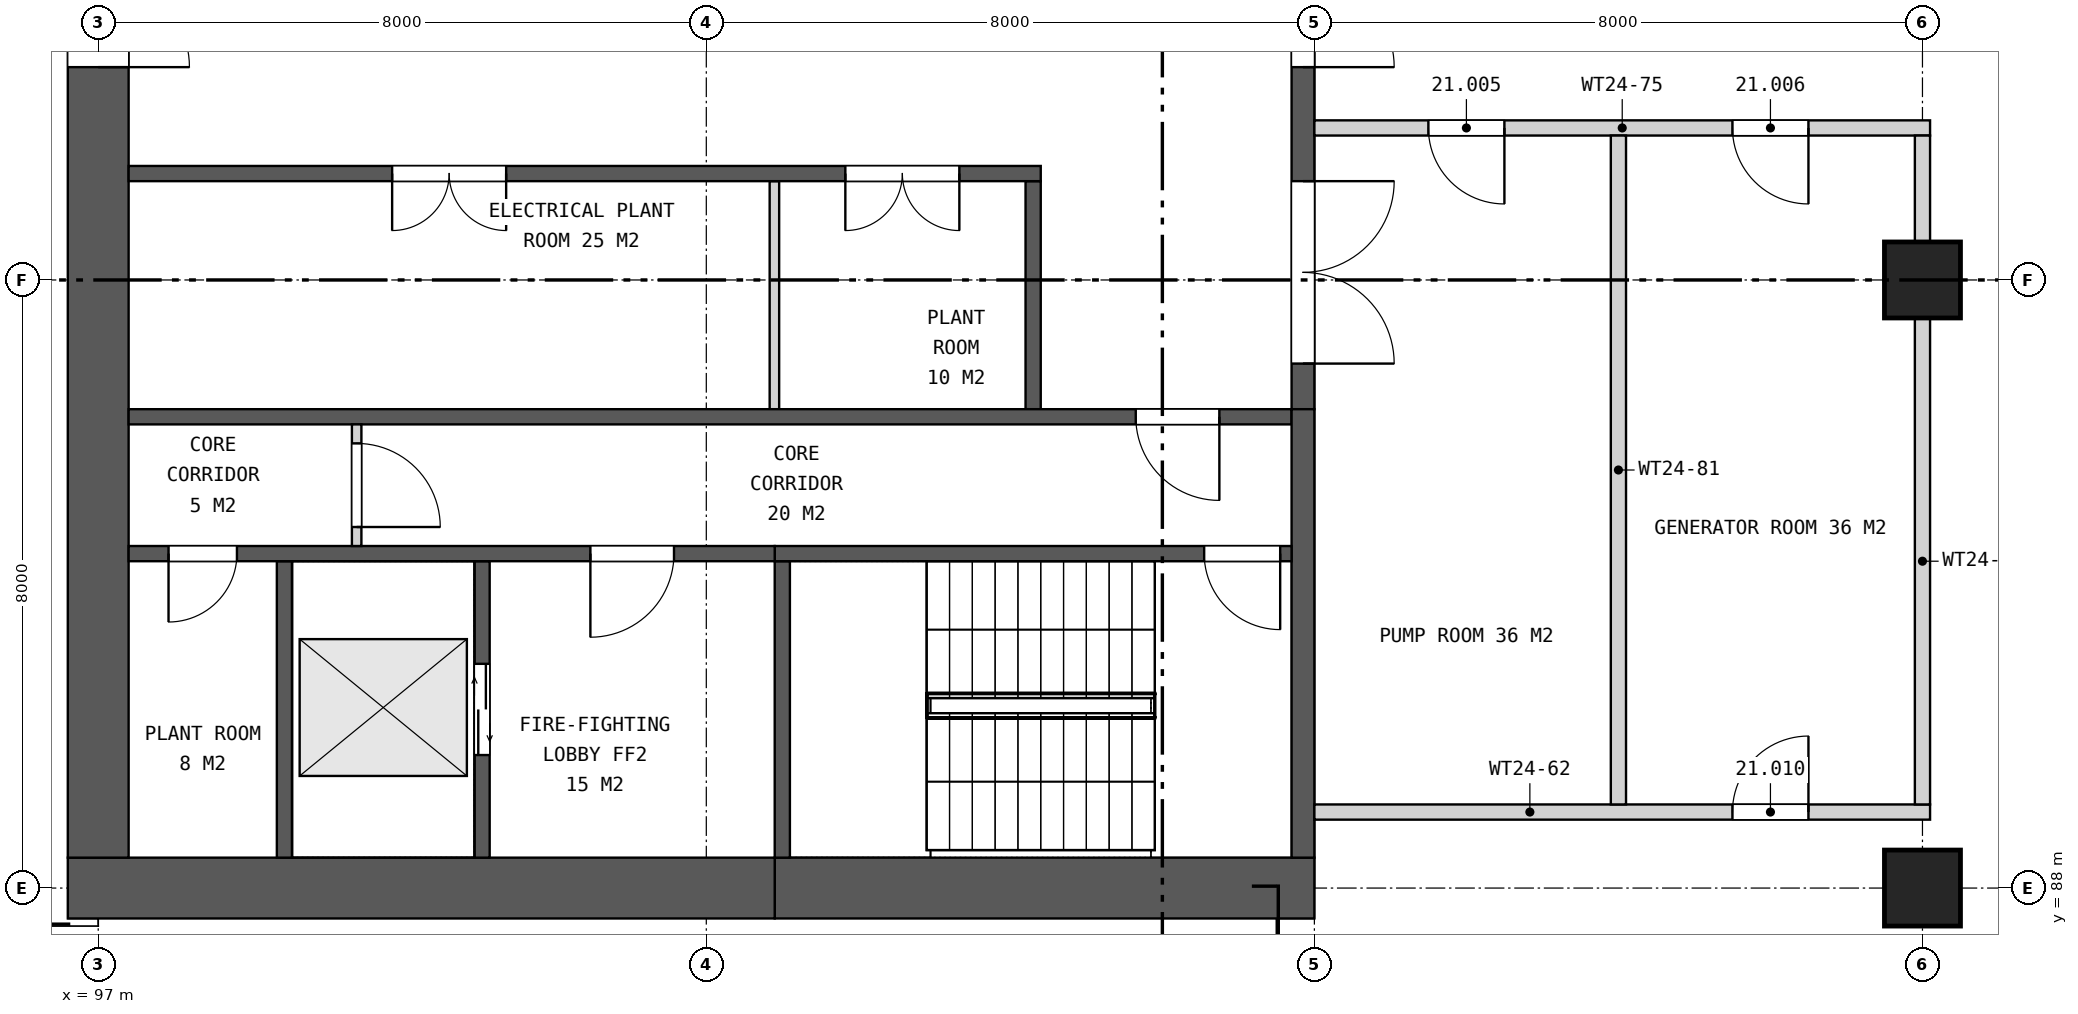
"""IFC4 building model, lengths in metres.
Left out: names, types, materials, properties, quantities, classifications, styles, units other than length and angle.
Written with IfcOpenShell. Run it as: python <this file> out.ifc"""

import sys

from ifc_helpers import new_model, si_unit, direction, frame, frame_2d, origin, origin_2d, place, context, subcontext, project, spatial, rectangle, extrude, element, fill, save


model = new_model("IFC4")
c1 = context("Model", 3, precision=1e-05, world=origin(), true_north=direction((0.0, 1.0)))
c2 = subcontext(c1, "Body", "Model", "MODEL_VIEW")
j1 = project(units=[si_unit("LENGTHUNIT", "METRE"), si_unit("PLANEANGLEUNIT", "RADIAN")], contexts=[c1])
p1 = place(None, origin())
s1 = spatial("IfcSite", under=j1, at=p1, CompositionType="ELEMENT")
p2 = place(p1, origin())
s2 = spatial("IfcBuilding", under=s1, at=p2, CompositionType="ELEMENT")
p3 = place(p2, frame((0.0, 0.0, 105.3)))
s3 = spatial("IfcBuildingStorey", under=s2, at=p3, CompositionType="ELEMENT", Elevation=105.3)
for number, where, z_axis, x_axis in (
    (1, (121.0, 88.0, 0.0), (0.0, 0.0, 1.0), (1.0, 0.0, 0.0)),
    (2, (121.0, 96.0, 0.0), (0.0, 0.0, 1.0), (1.0, 0.0, 0.0)),
):
    element("IfcColumn", number, at=place(p3, frame(where, z_axis=z_axis, x_axis=x_axis)), inside=s3, PredefinedType="COLUMN", context=c2, shape_type="SweptSolid", body=[
        extrude(rectangle(XDim=1.0, YDim=1.0, at=origin_2d()), origin(), (0.0, 0.0, 1.0), 7.4),
    ])
p4 = place(p3, frame((113.0, 88.0, 0.0), z_axis=(0.0, 0.0, 1.0), x_axis=(-1.0, 0.0, 0.0)))
e3 = element("IfcWall", 3, at=p4, inside=s3, PredefinedType="SHEAR", context=c2, shape_type="SweptSolid", body=[
    extrude(rectangle(XDim=7.1, YDim=0.8, at=frame_2d((3.55, 0.0))), origin(), (0.0, 0.0, 1.0), 7.4),
])
p5 = place(p3, frame((105.9, 88.0, 0.0), z_axis=(0.0, 0.0, 1.0), x_axis=(-1.0, 0.0, 0.0)))
e4 = element("IfcWall", 4, at=p5, inside=s3, PredefinedType="SHEAR", context=c2, shape_type="SweptSolid", body=[
    extrude(rectangle(XDim=9.3, YDim=0.8, at=frame_2d((4.65, 0.0))), origin(), (0.0, 0.0, 1.0), 7.4),
])
p6 = place(p3, frame((97.0, 111.6, 0.0), z_axis=(0.0, 0.0, 1.0), x_axis=(0.0, -1.0, 0.0)))
e5 = element("IfcWall", 5, at=p6, inside=s3, PredefinedType="SHEAR", context=c2, shape_type="SweptSolid", body=[
    extrude(rectangle(XDim=23.2, YDim=0.8, at=frame_2d((11.6, 0.0))), origin(), (0.0, 0.0, 1.0), 7.4),
])
p7 = place(p6, frame((10.4, 0.0, 0.0)))
e6 = element("IfcOpeningElement", 6, at=p7, cuts=e5, PredefinedType="OPENING", context=c2, shape_type="SweptSolid", body=[
    extrude(rectangle(XDim=2.4, YDim=2.4, at=frame_2d((1.2, 1.2))), frame((0.0, 0.41, 0.0), z_axis=(0.0, -1.0, 0.0), x_axis=(1.0, 0.0, 0.0)), (0.0, 0.0, 1.0), 0.82),
])
p8 = place(p3, frame((112.85, 105.7, 0.0), z_axis=(0.0, 0.0, 1.0), x_axis=(0.0, -1.0, 0.0)))
e7 = element("IfcWall", 7, at=p8, inside=s3, PredefinedType="SHEAR", context=c2, shape_type="SweptSolid", body=[
    extrude(rectangle(XDim=11.4, YDim=0.3, at=frame_2d((5.7, 0.0))), origin(), (0.0, 0.0, 1.0), 7.4),
])
p9 = place(p8, frame((0.6, 0.0, 0.0)))
e8 = element("IfcOpeningElement", 8, at=p9, cuts=e7, PredefinedType="OPENING", context=c2, shape_type="SweptSolid", body=[
    extrude(rectangle(XDim=2.4, YDim=2.4, at=frame_2d((1.2, 1.2))), frame((0.0, 0.16, 0.0), z_axis=(0.0, -1.0, 0.0), x_axis=(1.0, 0.0, 0.0)), (0.0, 0.0, 1.0), 0.32),
])
p10 = place(p8, frame((4.5, 0.0, 0.0)))
e9 = element("IfcOpeningElement", 9, at=p10, cuts=e7, PredefinedType="OPENING", context=c2, shape_type="SweptSolid", body=[
    extrude(rectangle(XDim=2.4, YDim=2.4, at=frame_2d((1.2, 1.2))), frame((0.0, 0.16, 0.0), z_axis=(0.0, -1.0, 0.0), x_axis=(1.0, 0.0, 0.0)), (0.0, 0.0, 1.0), 0.32),
])
p11 = place(p8, frame((8.4, 0.0, 0.0)))
e10 = element("IfcOpeningElement", 10, at=p11, cuts=e7, PredefinedType="OPENING", context=c2, shape_type="SweptSolid", body=[
    extrude(rectangle(XDim=2.4, YDim=2.4, at=frame_2d((1.2, 1.2))), frame((0.0, 0.16, 0.0), z_axis=(0.0, -1.0, 0.0), x_axis=(1.0, 0.0, 0.0)), (0.0, 0.0, 1.0), 0.32),
])
p12 = place(p3, frame((109.3, 97.3, 0.0), z_axis=(0.0, 0.0, 1.0), x_axis=(0.0, -1.0, 0.0)))
e11 = element("IfcWall", 11, at=p12, inside=s3, PredefinedType="SHEAR", context=c2, shape_type="SweptSolid", body=[
    extrude(rectangle(XDim=3.0, YDim=0.2, at=frame_2d((1.5, 0.0))), origin(), (0.0, 0.0, 1.0), 7.4),
])
p13 = place(p3, frame((105.896, 97.3, 0.0), z_axis=(0.0, 0.0, 1.0), x_axis=(0.0, -1.0, 0.0)))
e12 = element("IfcWall", 12, at=p13, inside=s3, PredefinedType="PARTITIONING", context=c2, shape_type="SweptSolid", body=[
    extrude(rectangle(XDim=3.0, YDim=0.125, at=frame_2d((1.5, 0.0))), origin(), (0.0, 0.0, 1.0), 7.4),
])
p14 = place(p3, frame((109.4, 97.4, 0.0), z_axis=(0.0, 0.0, 1.0), x_axis=(-1.0, 0.0, 0.0)))
e13 = element("IfcWall", 13, at=p14, inside=s3, PredefinedType="SHEAR", context=c2, shape_type="SweptSolid", body=[
    extrude(rectangle(XDim=12.0, YDim=0.2, at=frame_2d((6.0, 0.0))), origin(), (0.0, 0.0, 1.0), 7.4),
])
p15 = place(p14, frame((1.071, 0.0, 0.0)))
e14 = element("IfcOpeningElement", 14, at=p15, cuts=e13, PredefinedType="OPENING", context=c2, shape_type="SweptSolid", body=[
    extrude(rectangle(XDim=1.5, YDim=2.1, at=frame_2d((0.75, 1.05))), frame((0.0, 0.11, 0.0), z_axis=(0.0, -1.0, 0.0), x_axis=(1.0, 0.0, 0.0)), (0.0, 0.0, 1.0), 0.22),
])
p16 = place(p14, frame((7.033, 0.0, 0.0)))
e15 = element("IfcOpeningElement", 15, at=p16, cuts=e13, PredefinedType="OPENING", context=c2, shape_type="SweptSolid", body=[
    extrude(rectangle(XDim=1.5, YDim=2.1, at=frame_2d((0.75, 1.05))), frame((0.0, 0.11, 0.0), z_axis=(0.0, -1.0, 0.0), x_axis=(1.0, 0.0, 0.0)), (0.0, 0.0, 1.0), 0.22),
])
p17 = place(p3, frame((112.7, 94.2, 0.0), z_axis=(0.0, 0.0, 1.0), x_axis=(-1.0, 0.0, 0.0)))
e16 = element("IfcWall", 16, at=p17, inside=s3, PredefinedType="SHEAR", context=c2, shape_type="SweptSolid", body=[
    extrude(rectangle(XDim=15.3, YDim=0.2, at=frame_2d((7.65, 0.0))), origin(), (0.0, 0.0, 1.0), 7.4),
])
p18 = place(p17, frame((0.95, 0.0, 0.0)))
e17 = element("IfcOpeningElement", 17, at=p18, cuts=e16, PredefinedType="OPENING", context=c2, shape_type="SweptSolid", body=[
    extrude(rectangle(XDim=1.1, YDim=2.1, at=frame_2d((0.55, 1.05))), frame((0.0, 0.11, 0.0), z_axis=(0.0, -1.0, 0.0), x_axis=(1.0, 0.0, 0.0)), (0.0, 0.0, 1.0), 0.22),
])
p19 = place(p3, frame((112.85, 94.3, 0.0), z_axis=(0.0, 0.0, 1.0), x_axis=(0.0, -1.0, 0.0)))
e18 = element("IfcWall", 18, at=p19, inside=s3, PredefinedType="SHEAR", context=c2, shape_type="SweptSolid", body=[
    extrude(rectangle(XDim=5.9, YDim=0.3, at=frame_2d((2.95, 0.0))), origin(), (0.0, 0.0, 1.0), 7.4),
])
p20 = place(p3, frame((106.0, 92.3, 0.0), z_axis=(0.0, 0.0, 1.0), x_axis=(0.0, -1.0, 0.0)))
e19 = element("IfcWall", 19, at=p20, inside=s3, PredefinedType="SHEAR", context=c2, shape_type="SweptSolid", body=[
    extrude(rectangle(XDim=3.9, YDim=0.2, at=frame_2d((1.95, 0.0))), origin(), (0.0, 0.0, 1.0), 7.4),
])
p21 = place(p3, frame((102.05, 92.3, 0.0), z_axis=(0.0, 0.0, 1.0), x_axis=(0.0, -1.0, 0.0)))
e20 = element("IfcWall", 20, at=p21, inside=s3, PredefinedType="SHEAR", context=c2, shape_type="SweptSolid", body=[
    extrude(rectangle(XDim=3.9, YDim=0.2, at=frame_2d((1.95, 0.0))), origin(), (0.0, 0.0, 1.0), 7.4),
])
p22 = place(p21, frame((1.35, 0.0, 0.0)))
e21 = element("IfcOpeningElement", 21, at=p22, cuts=e20, PredefinedType="OPENING", context=c2, shape_type="SweptSolid", body=[
    extrude(rectangle(XDim=1.2, YDim=2.1, at=frame_2d((0.6, 1.05))), frame((0.0, 0.11, 0.0), z_axis=(0.0, -1.0, 0.0), x_axis=(1.0, 0.0, 0.0)), (0.0, 0.0, 1.0), 0.22),
])
p23 = place(p3, frame((99.45, 92.3, 0.0), z_axis=(0.0, 0.0, 1.0), x_axis=(0.0, -1.0, 0.0)))
e22 = element("IfcWall", 22, at=p23, inside=s3, PredefinedType="SHEAR", context=c2, shape_type="SweptSolid", body=[
    extrude(rectangle(XDim=3.9, YDim=0.2, at=frame_2d((1.95, 0.0))), origin(), (0.0, 0.0, 1.0), 7.4),
])
p24 = place(p3, frame((112.7, 92.4, 0.0), z_axis=(0.0, 0.0, 1.0), x_axis=(-1.0, 0.0, 0.0)))
e23 = element("IfcWall", 23, at=p24, inside=s3, PredefinedType="SHEAR", context=c2, shape_type="SweptSolid", body=[
    extrude(rectangle(XDim=6.8, YDim=0.2, at=frame_2d((3.4, 0.0))), origin(), (0.0, 0.0, 1.0), 7.4),
])
p25 = place(p24, frame((0.15, 0.0, 0.0)))
e24 = element("IfcOpeningElement", 24, at=p25, cuts=e23, PredefinedType="OPENING", context=c2, shape_type="SweptSolid", body=[
    extrude(rectangle(XDim=1.0, YDim=2.1, at=frame_2d((0.5, 1.05))), frame((0.0, 0.11, 0.0), z_axis=(0.0, -1.0, 0.0), x_axis=(1.0, 0.0, 0.0)), (0.0, 0.0, 1.0), 0.22),
])
p26 = place(p3, frame((105.9, 92.4, 0.0), z_axis=(0.0, 0.0, 1.0), x_axis=(-1.0, 0.0, 0.0)))
e25 = element("IfcWall", 25, at=p26, inside=s3, PredefinedType="SHEAR", context=c2, shape_type="SweptSolid", body=[
    extrude(rectangle(XDim=8.5, YDim=0.2, at=frame_2d((4.25, 0.0))), origin(), (0.0, 0.0, 1.0), 7.4),
])
p27 = place(p26, frame((1.325, 0.0, 0.0)))
e26 = element("IfcOpeningElement", 26, at=p27, cuts=e25, PredefinedType="OPENING", context=c2, shape_type="SweptSolid", body=[
    extrude(rectangle(XDim=1.1, YDim=2.1, at=frame_2d((0.55, 1.05))), frame((0.0, 0.11, 0.0), z_axis=(0.0, -1.0, 0.0), x_axis=(1.0, 0.0, 0.0)), (0.0, 0.0, 1.0), 0.22),
])
p28 = place(p26, frame((7.075, 0.0, 0.0)))
e27 = element("IfcOpeningElement", 27, at=p28, cuts=e25, PredefinedType="OPENING", context=c2, shape_type="SweptSolid", body=[
    extrude(rectangle(XDim=0.9, YDim=2.1, at=frame_2d((0.45, 1.05))), frame((0.0, 0.11, 0.0), z_axis=(0.0, -1.0, 0.0), x_axis=(1.0, 0.0, 0.0)), (0.0, 0.0, 1.0), 0.22),
])
p29 = place(p3, frame((100.4, 94.1, 0.0), z_axis=(0.0, 0.0, 1.0), x_axis=(0.0, -1.0, 0.0)))
e28 = element("IfcWall", 28, at=p29, inside=s3, PredefinedType="PARTITIONING", context=c2, shape_type="SweptSolid", body=[
    extrude(rectangle(XDim=1.6, YDim=0.125, at=frame_2d((0.8, 0.0))), origin(), (0.0, 0.0, 1.0), 7.4),
])
p30 = place(p29, frame((0.25, 0.0, 0.0)))
e29 = element("IfcOpeningElement", 29, at=p30, cuts=e28, PredefinedType="OPENING", context=c2, shape_type="SweptSolid", body=[
    extrude(rectangle(XDim=1.1, YDim=2.1, at=frame_2d((0.55, 1.05))), frame((0.0, 0.073, 0.0), z_axis=(0.0, -1.0, 0.0), x_axis=(1.0, 0.0, 0.0)), (0.0, 0.0, 1.0), 0.145),
])
p31 = place(p3, frame((113.0, 89.0, 0.0), z_axis=(0.0, 0.0, 1.0), x_axis=(1.0, 0.0, 0.0)))
e30 = element("IfcWall", 30, at=p31, inside=s3, PredefinedType="SOLIDWALL", context=c2, shape_type="SweptSolid", body=[
    extrude(rectangle(XDim=8.1, YDim=0.2, at=frame_2d((4.05, 0.0))), origin(), (0.0, 0.0, 1.0), 6.64),
])
p32 = place(p31, frame((5.5, 0.0, 0.0)))
e31 = element("IfcOpeningElement", 31, at=p32, cuts=e30, PredefinedType="OPENING", context=c2, shape_type="SweptSolid", body=[
    extrude(rectangle(XDim=1.0, YDim=2.2, at=frame_2d((0.5, 1.1))), frame((0.0, 0.11, 0.0), z_axis=(0.0, -1.0, 0.0), x_axis=(1.0, 0.0, 0.0)), (0.0, 0.0, 1.0), 0.22),
])
p33 = place(p3, frame((113.0, 98.0, 0.0), z_axis=(0.0, 0.0, 1.0), x_axis=(1.0, 0.0, 0.0)))
e32 = element("IfcWall", 32, at=p33, inside=s3, PredefinedType="SOLIDWALL", context=c2, shape_type="SweptSolid", body=[
    extrude(rectangle(XDim=8.1, YDim=0.2, at=frame_2d((4.05, 0.0))), origin(), (0.0, 0.0, 1.0), 6.64),
])
p34 = place(p33, frame((1.5, 0.0, 0.0)))
e33 = element("IfcOpeningElement", 33, at=p34, cuts=e32, PredefinedType="OPENING", context=c2, shape_type="SweptSolid", body=[
    extrude(rectangle(XDim=1.0, YDim=2.2, at=frame_2d((0.5, 1.1))), frame((0.0, 0.11, 0.0), z_axis=(0.0, -1.0, 0.0), x_axis=(1.0, 0.0, 0.0)), (0.0, 0.0, 1.0), 0.22),
])
p35 = place(p33, frame((5.5, 0.0, 0.0)))
e34 = element("IfcOpeningElement", 34, at=p35, cuts=e32, PredefinedType="OPENING", context=c2, shape_type="SweptSolid", body=[
    extrude(rectangle(XDim=1.0, YDim=2.2, at=frame_2d((0.5, 1.1))), frame((0.0, 0.11, 0.0), z_axis=(0.0, -1.0, 0.0), x_axis=(1.0, 0.0, 0.0)), (0.0, 0.0, 1.0), 0.22),
])
p36 = place(p3, frame((117.0, 89.1, 0.0), z_axis=(0.0, 0.0, 1.0), x_axis=(0.0, 1.0, 0.0)))
e35 = element("IfcWall", 35, at=p36, inside=s3, PredefinedType="SOLIDWALL", context=c2, shape_type="SweptSolid", body=[
    extrude(rectangle(XDim=8.8, YDim=0.2, at=frame_2d((4.4, 0.0))), origin(), (0.0, 0.0, 1.0), 6.636),
])
p37 = place(p3, frame((121.0, 89.1, 0.0), z_axis=(0.0, 0.0, 1.0), x_axis=(0.0, 1.0, 0.0)))
e36 = element("IfcWall", 36, at=p37, inside=s3, PredefinedType="SOLIDWALL", context=c2, shape_type="SweptSolid", body=[
    extrude(rectangle(XDim=6.4, YDim=0.2, at=frame_2d((3.2, 0.0))), origin(), (0.0, 0.0, 1.0), 6.64),
])
p38 = place(p3, frame((121.0, 96.5, 0.0), z_axis=(0.0, 0.0, 1.0), x_axis=(0.0, 1.0, 0.0)))
e37 = element("IfcWall", 37, at=p38, inside=s3, PredefinedType="SOLIDWALL", context=c2, shape_type="SweptSolid", body=[
    extrude(rectangle(XDim=1.4, YDim=0.2, at=frame_2d((0.7, 0.0))), origin(), (0.0, 0.0, 1.0), 6.64),
])
p39 = place(p7, origin())
e38 = element("IfcDoor", 38, at=p39, inside=s3, OperationType="DOUBLE_DOOR_SINGLE_SWING", PredefinedType="DOOR", context=c2, shape_type="SweptSolid", body=[
    extrude(rectangle(XDim=2.4, YDim=2.4, at=frame_2d((1.2, 1.2))), frame((0.0, 0.025, 0.0), z_axis=(0.0, -1.0, 0.0), x_axis=(1.0, 0.0, 0.0)), (0.0, 0.0, 1.0), 0.05),
])
fill(e6, e38)
p40 = place(p10, origin())
e39 = element("IfcDoor", 39, at=p40, inside=s3, OperationType="DOUBLE_DOOR_SINGLE_SWING", PredefinedType="DOOR", context=c2, shape_type="SweptSolid", body=[
    extrude(rectangle(XDim=2.4, YDim=2.4, at=frame_2d((1.2, 1.2))), frame((0.0, 0.025, 0.0), z_axis=(0.0, -1.0, 0.0), x_axis=(1.0, 0.0, 0.0)), (0.0, 0.0, 1.0), 0.05),
])
fill(e9, e39)
p41 = place(p11, origin())
e40 = element("IfcDoor", 40, at=p41, inside=s3, OperationType="DOUBLE_DOOR_SINGLE_SWING", PredefinedType="DOOR", context=c2, shape_type="SweptSolid", body=[
    extrude(rectangle(XDim=2.4, YDim=2.4, at=frame_2d((1.2, 1.2))), frame((0.0, 0.025, 0.0), z_axis=(0.0, -1.0, 0.0), x_axis=(1.0, 0.0, 0.0)), (0.0, 0.0, 1.0), 0.05),
])
fill(e10, e40)
p42 = place(p15, origin())
e41 = element("IfcDoor", 41, at=p42, inside=s3, OperationType="DOUBLE_DOOR_SINGLE_SWING", PredefinedType="DOOR", context=c2, shape_type="SweptSolid", body=[
    extrude(rectangle(XDim=1.5, YDim=2.1, at=frame_2d((0.75, 1.05))), frame((0.0, 0.025, 0.0), z_axis=(0.0, -1.0, 0.0), x_axis=(1.0, 0.0, 0.0)), (0.0, 0.0, 1.0), 0.05),
])
fill(e14, e41)
p43 = place(p16, origin())
e42 = element("IfcDoor", 42, at=p43, inside=s3, OperationType="DOUBLE_DOOR_SINGLE_SWING", PredefinedType="DOOR", context=c2, shape_type="SweptSolid", body=[
    extrude(rectangle(XDim=1.5, YDim=2.1, at=frame_2d((0.75, 1.05))), frame((0.0, 0.025, 0.0), z_axis=(0.0, -1.0, 0.0), x_axis=(1.0, 0.0, 0.0)), (0.0, 0.0, 1.0), 0.05),
])
fill(e15, e42)
p44 = place(p18, origin())
e43 = element("IfcDoor", 43, at=p44, inside=s3, OperationType="SINGLE_SWING_LEFT", PredefinedType="DOOR", context=c2, shape_type="SweptSolid", body=[
    extrude(rectangle(XDim=1.1, YDim=2.1, at=frame_2d((0.55, 1.05))), frame((0.0, 0.025, 0.0), z_axis=(0.0, -1.0, 0.0), x_axis=(1.0, 0.0, 0.0)), (0.0, 0.0, 1.0), 0.05),
])
fill(e17, e43)
p45 = place(p22, origin())
e44 = element("IfcDoor", 44, at=p45, inside=s3, OperationType="DOUBLE_DOOR_SLIDING", PredefinedType="DOOR", context=c2, shape_type="SweptSolid", body=[
    extrude(rectangle(XDim=1.2, YDim=2.1, at=frame_2d((0.6, 1.05))), frame((0.0, 0.025, 0.0), z_axis=(0.0, -1.0, 0.0), x_axis=(1.0, 0.0, 0.0)), (0.0, 0.0, 1.0), 0.05),
])
fill(e21, e44)
p46 = place(p25, origin())
e45 = element("IfcDoor", 45, at=p46, inside=s3, OperationType="SINGLE_SWING_LEFT", PredefinedType="DOOR", context=c2, shape_type="SweptSolid", body=[
    extrude(rectangle(XDim=1.0, YDim=2.1, at=frame_2d((0.5, 1.05))), frame((0.0, 0.025, 0.0), z_axis=(0.0, -1.0, 0.0), x_axis=(1.0, 0.0, 0.0)), (0.0, 0.0, 1.0), 0.05),
])
fill(e24, e45)
p47 = place(p27, origin())
e46 = element("IfcDoor", 46, at=p47, inside=s3, OperationType="SINGLE_SWING_RIGHT", PredefinedType="DOOR", context=c2, shape_type="SweptSolid", body=[
    extrude(rectangle(XDim=1.1, YDim=2.1, at=frame_2d((0.55, 1.05))), frame((0.0, 0.025, 0.0), z_axis=(0.0, -1.0, 0.0), x_axis=(1.0, 0.0, 0.0)), (0.0, 0.0, 1.0), 0.05),
])
fill(e26, e46)
p48 = place(p28, origin())
e47 = element("IfcDoor", 47, at=p48, inside=s3, OperationType="SINGLE_SWING_RIGHT", PredefinedType="DOOR", context=c2, shape_type="SweptSolid", body=[
    extrude(rectangle(XDim=0.9, YDim=2.1, at=frame_2d((0.45, 1.05))), frame((0.0, 0.025, 0.0), z_axis=(0.0, -1.0, 0.0), x_axis=(1.0, 0.0, 0.0)), (0.0, 0.0, 1.0), 0.05),
])
fill(e27, e47)
p49 = place(p30, origin())
e48 = element("IfcDoor", 48, at=p49, inside=s3, OperationType="SINGLE_SWING_RIGHT", PredefinedType="DOOR", context=c2, shape_type="SweptSolid", body=[
    extrude(rectangle(XDim=1.1, YDim=2.1, at=frame_2d((0.55, 1.05))), frame((0.0, 0.025, 0.0), z_axis=(0.0, -1.0, 0.0), x_axis=(1.0, 0.0, 0.0)), (0.0, 0.0, 1.0), 0.05),
])
fill(e29, e48)
p50 = place(p34, frame((1.0, 0.0, 0.0), z_axis=(0.0, 0.0, 1.0), x_axis=(-1.0, 0.0, 0.0)))
e49 = element("IfcDoor", 49, at=p50, inside=s3, OperationType="SINGLE_SWING_LEFT", PredefinedType="DOOR", context=c2, shape_type="SweptSolid", body=[
    extrude(rectangle(XDim=1.0, YDim=2.2, at=frame_2d((0.5, 1.1))), frame((0.0, 0.025, 0.0), z_axis=(0.0, -1.0, 0.0), x_axis=(1.0, 0.0, 0.0)), (0.0, 0.0, 1.0), 0.05),
])
fill(e33, e49)
p51 = place(p35, frame((1.0, 0.0, 0.0), z_axis=(0.0, 0.0, 1.0), x_axis=(-1.0, 0.0, 0.0)))
e50 = element("IfcDoor", 50, at=p51, inside=s3, OperationType="SINGLE_SWING_LEFT", PredefinedType="DOOR", context=c2, shape_type="SweptSolid", body=[
    extrude(rectangle(XDim=1.0, YDim=2.2, at=frame_2d((0.5, 1.1))), frame((0.0, 0.025, 0.0), z_axis=(0.0, -1.0, 0.0), x_axis=(1.0, 0.0, 0.0)), (0.0, 0.0, 1.0), 0.05),
])
fill(e34, e50)
p52 = place(p32, origin())
e51 = element("IfcDoor", 51, at=p52, inside=s3, OperationType="SINGLE_SWING_RIGHT", PredefinedType="DOOR", context=c2, shape_type="SweptSolid", body=[
    extrude(rectangle(XDim=1.0, YDim=2.2, at=frame_2d((0.5, 1.1))), frame((0.0, 0.025, 0.0), z_axis=(0.0, -1.0, 0.0), x_axis=(1.0, 0.0, 0.0)), (0.0, 0.0, 1.0), 0.05),
])
fill(e31, e51)
save(model, sys.argv[1])
